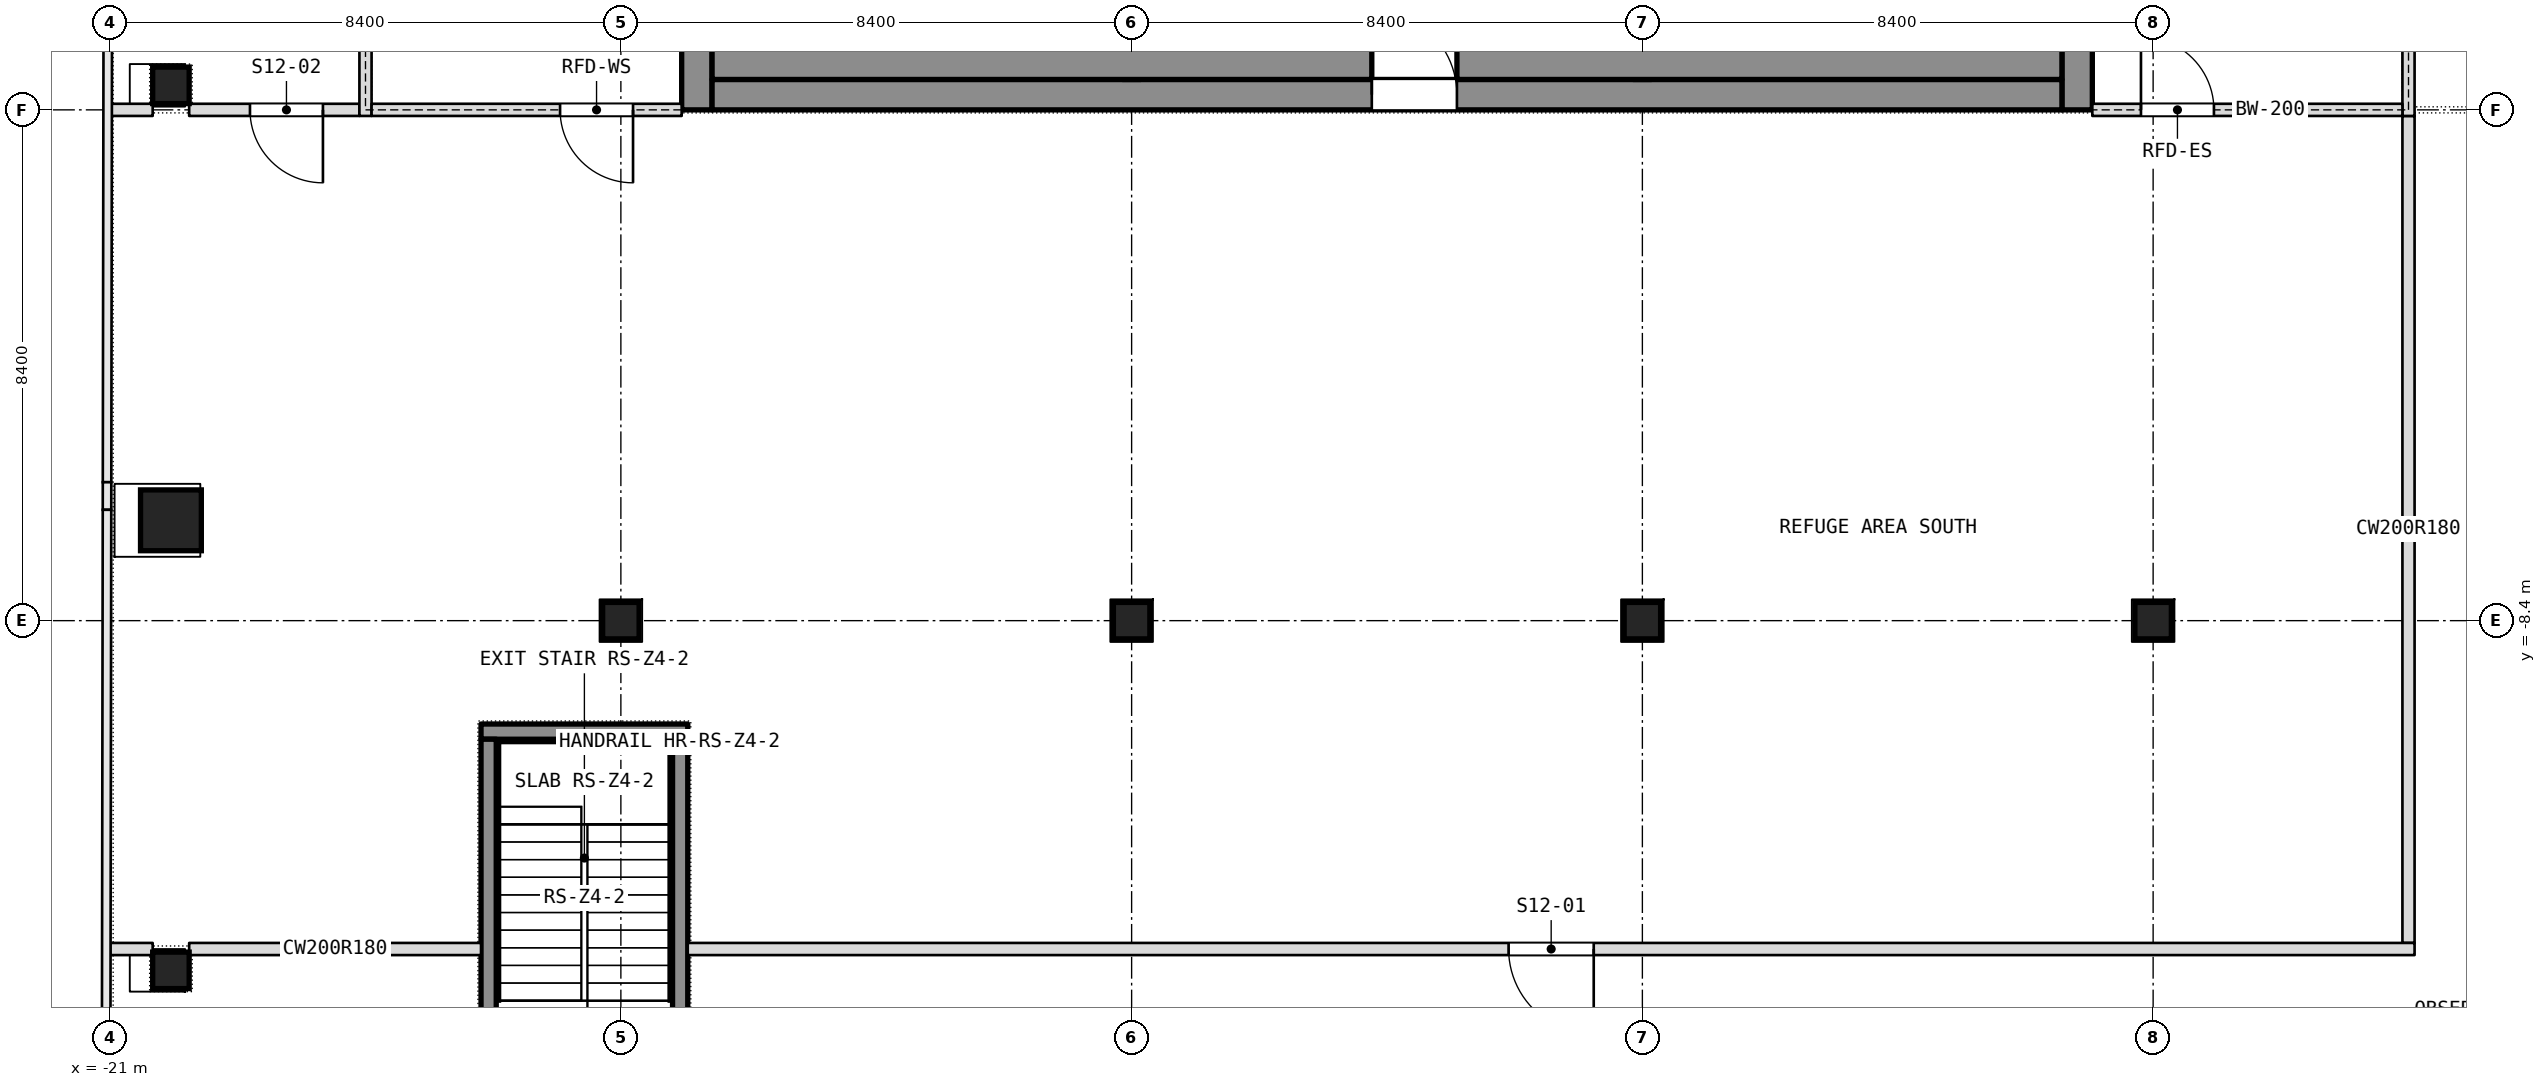
"""IFC4 building model, lengths in metres.
Left out: names, types, materials, properties, quantities, classifications, styles, units other than length and angle.
Written with IfcOpenShell. Run it as: python <this file> out.ifc"""

import sys

from ifc_helpers import new_model, si_unit, direction, frame, frame_2d, origin, origin_2d, place, context, subcontext, project, spatial, rectangle, extrude, element, fill, save


model = new_model("IFC4")
c1 = context("Model", 3, precision=1e-05, world=origin(), true_north=direction((0.0, 1.0)))
c2 = subcontext(c1, "Body", "Model", "MODEL_VIEW")
j1 = project(units=[si_unit("LENGTHUNIT", "METRE"), si_unit("PLANEANGLEUNIT", "RADIAN")], contexts=[c1])
p1 = place(None, origin())
s1 = spatial("IfcSite", under=j1, at=p1, CompositionType="ELEMENT")
p2 = place(p1, origin())
s2 = spatial("IfcBuilding", under=s1, at=p2, CompositionType="ELEMENT")
p3 = place(p2, frame((0.0, 0.0, 281.3)))
s3 = spatial("IfcBuildingStorey", under=s2, at=p3, CompositionType="ELEMENT", Elevation=281.3)
p4 = place(p3, frame((11.35, 0.0, 0.0), z_axis=(0.0, 0.0, 1.0), x_axis=(0.0, 1.0, 0.0)))
e1 = element("IfcWall", 1, at=p4, inside=s3, PredefinedType="SHEAR", context=c2, shape_type="SweptSolid", body=[
    extrude(rectangle(XDim=16.8, YDim=0.5, at=frame_2d((8.4, 0.0))), origin(), (0.0, 0.0, 1.0), 7.2),
])
p5 = place(p4, frame((6.825, 0.0, 0.0)))
e2 = element("IfcOpeningElement", 2, at=p5, cuts=e1, PredefinedType="OPENING", context=c2, shape_type="SweptSolid", body=[
    extrude(rectangle(XDim=1.2, YDim=2.1, at=frame_2d((0.6, 1.05))), frame((0.0, 0.25, 0.0), z_axis=(0.0, -1.0, 0.0), x_axis=(1.0, 0.0, 0.0)), (0.0, 0.0, 1.0), 0.5),
])
p6 = place(p4, frame((8.775, 0.0, 0.0)))
e3 = element("IfcOpeningElement", 3, at=p6, cuts=e1, PredefinedType="OPENING", context=c2, shape_type="SweptSolid", body=[
    extrude(rectangle(XDim=1.2, YDim=2.1, at=frame_2d((0.6, 1.05))), frame((0.0, 0.25, 0.0), z_axis=(0.0, -1.0, 0.0), x_axis=(1.0, 0.0, 0.0)), (0.0, 0.0, 1.0), 0.5),
])
p7 = place(p3, frame((-11.35, 0.0, 0.0), z_axis=(0.0, 0.0, 1.0), x_axis=(0.0, 1.0, 0.0)))
e4 = element("IfcWall", 4, at=p7, inside=s3, PredefinedType="SHEAR", context=c2, shape_type="SweptSolid", body=[
    extrude(rectangle(XDim=16.8, YDim=0.5, at=frame_2d((8.4, 0.0))), origin(), (0.0, 0.0, 1.0), 7.2),
])
p8 = place(p7, frame((1.688, 0.0, 0.0)))
e5 = element("IfcOpeningElement", 5, at=p8, cuts=e4, PredefinedType="OPENING", context=c2, shape_type="SweptSolid", body=[
    extrude(rectangle(XDim=0.9, YDim=2.1, at=frame_2d((0.45, 1.05))), frame((0.0, 0.25, 0.0), z_axis=(0.0, -1.0, 0.0), x_axis=(1.0, 0.0, 0.0)), (0.0, 0.0, 1.0), 0.5),
])
p9 = place(p7, frame((4.312, 0.0, 0.0)))
e6 = element("IfcOpeningElement", 6, at=p9, cuts=e4, PredefinedType="OPENING", context=c2, shape_type="SweptSolid", body=[
    extrude(rectangle(XDim=0.9, YDim=2.1, at=frame_2d((0.45, 1.05))), frame((0.0, 0.25, 0.0), z_axis=(0.0, -1.0, 0.0), x_axis=(1.0, 0.0, 0.0)), (0.0, 0.0, 1.0), 0.5),
])
p10 = place(p7, frame((6.825, 0.0, 0.0)))
e7 = element("IfcOpeningElement", 7, at=p10, cuts=e4, PredefinedType="OPENING", context=c2, shape_type="SweptSolid", body=[
    extrude(rectangle(XDim=1.2, YDim=2.1, at=frame_2d((0.6, 1.05))), frame((0.0, 0.25, 0.0), z_axis=(0.0, -1.0, 0.0), x_axis=(1.0, 0.0, 0.0)), (0.0, 0.0, 1.0), 0.5),
])
p11 = place(p7, frame((12.3, 0.0, 0.0)))
e8 = element("IfcOpeningElement", 8, at=p11, cuts=e4, PredefinedType="OPENING", context=c2, shape_type="SweptSolid", body=[
    extrude(rectangle(XDim=0.9, YDim=2.1, at=frame_2d((0.45, 1.05))), frame((0.0, 0.25, 0.0), z_axis=(0.0, -1.0, 0.0), x_axis=(1.0, 0.0, 0.0)), (0.0, 0.0, 1.0), 0.5),
])
p12 = place(p7, frame((8.775, 0.0, 0.0)))
e9 = element("IfcOpeningElement", 9, at=p12, cuts=e4, PredefinedType="OPENING", context=c2, shape_type="SweptSolid", body=[
    extrude(rectangle(XDim=1.2, YDim=2.1, at=frame_2d((0.6, 1.05))), frame((0.0, 0.25, 0.0), z_axis=(0.0, -1.0, 0.0), x_axis=(1.0, 0.0, 0.0)), (0.0, 0.0, 1.0), 0.5),
])
p13 = place(p3, frame((-11.1, 0.25, 0.0), z_axis=(0.0, 0.0, 1.0), x_axis=(1.0, 0.0, 0.0)))
e10 = element("IfcWall", 10, at=p13, inside=s3, PredefinedType="SHEAR", context=c2, shape_type="SweptSolid", body=[
    extrude(rectangle(XDim=22.2, YDim=0.5, at=frame_2d((11.1, 0.0))), origin(), (0.0, 0.0, 1.0), 7.2),
])
p14 = place(p13, frame((10.85, 0.0, 0.0)))
e11 = element("IfcOpeningElement", 11, at=p14, cuts=e10, PredefinedType="OPENING", context=c2, shape_type="SweptSolid", body=[
    extrude(rectangle(XDim=1.4, YDim=2.1, at=frame_2d((0.7, 1.05))), frame((0.0, 0.25, 0.0), z_axis=(0.0, -1.0, 0.0), x_axis=(1.0, 0.0, 0.0)), (0.0, 0.0, 1.0), 0.5),
])
p15 = place(p3, frame((-4.2, 0.5, 0.0), z_axis=(0.0, 0.0, 1.0), x_axis=(0.0, 1.0, 0.0)))
e12 = element("IfcWall", 12, at=p15, inside=s3, PredefinedType="SHEAR", context=c2, shape_type="SweptSolid", body=[
    extrude(rectangle(XDim=15.8, YDim=0.3, at=frame_2d((7.9, 0.0))), origin(), (0.0, 0.0, 1.0), 7.2),
])
p16 = place(p15, frame((8.8, 0.0, 0.0)))
e13 = element("IfcOpeningElement", 13, at=p16, cuts=e12, PredefinedType="OPENING", context=c2, shape_type="SweptSolid", body=[
    extrude(rectangle(XDim=1.2, YDim=2.1, at=frame_2d((0.6, 1.05))), frame((0.0, 0.15, 0.0), z_axis=(0.0, -1.0, 0.0), x_axis=(1.0, 0.0, 0.0)), (0.0, 0.0, 1.0), 0.3),
])
p17 = place(p3, frame((4.2, 0.5, 0.0), z_axis=(0.0, 0.0, 1.0), x_axis=(0.0, 1.0, 0.0)))
e14 = element("IfcWall", 14, at=p17, inside=s3, PredefinedType="SHEAR", context=c2, shape_type="SweptSolid", body=[
    extrude(rectangle(XDim=15.8, YDim=0.3, at=frame_2d((7.9, 0.0))), origin(), (0.0, 0.0, 1.0), 7.2),
])
p18 = place(p17, frame((6.25, 0.0, 0.0)))
e15 = element("IfcOpeningElement", 15, at=p18, cuts=e14, PredefinedType="OPENING", context=c2, shape_type="SweptSolid", body=[
    extrude(rectangle(XDim=1.2, YDim=2.1, at=frame_2d((0.6, 1.05))), frame((0.0, 0.15, 0.0), z_axis=(0.0, -1.0, 0.0), x_axis=(1.0, 0.0, 0.0)), (0.0, 0.0, 1.0), 0.3),
])
p19 = place(p3, frame((-20.0, -6.75, 0.0), z_axis=(0.0, 0.0, 1.0), x_axis=(1.0, 0.0, 0.0)))
e16 = element("IfcColumn", 16, at=p19, inside=s3, PredefinedType="COLUMN", context=c2, shape_type="SweptSolid", body=[
    extrude(rectangle(XDim=1.0, YDim=1.0, at=origin_2d()), origin(), (0.0, 0.0, 1.0), 7.2),
])
for number, where, z_axis, x_axis in (
    (17, (-12.6, -8.4, 0.0), (0.0, 0.0, 1.0), (1.0, 0.0, 0.0)),
    (18, (-4.2, -8.4, 0.0), (0.0, 0.0, 1.0), (1.0, 0.0, 0.0)),
    (19, (4.2, -8.4, 0.0), (0.0, 0.0, 1.0), (1.0, 0.0, 0.0)),
    (20, (12.6, -8.4, 0.0), (0.0, 0.0, 1.0), (1.0, 0.0, 0.0)),
    (21, (-20.0, -14.151, 0.0), (0.0, 0.0, 1.0), (1.0, 0.0, 0.0)),
    (22, (-20.0, 0.403, 0.0), (0.0, 0.0, 1.0), (1.0, 0.0, 0.0)),
):
    element("IfcColumn", number, at=place(p3, frame(where, z_axis=z_axis, x_axis=x_axis)), inside=s3, PredefinedType="COLUMN", context=c2, shape_type="SweptSolid", body=[
        extrude(rectangle(XDim=0.6, YDim=0.6, at=origin_2d()), origin(), (0.0, 0.0, 1.0), 7.2),
    ])
p20 = place(p3, frame((16.8, -13.7, 0.0), z_axis=(0.0, 0.0, 1.0), x_axis=(0.0, 1.0, 0.0)))
e23 = element("IfcWall", 23, at=p20, inside=s3, PredefinedType="PARTITIONING", context=c2, shape_type="SweptSolid", body=[
    extrude(rectangle(XDim=13.6, YDim=0.2, at=frame_2d((6.8, 0.0))), origin(), (0.0, 0.0, 1.0), 6.94),
])
p21 = place(p3, frame((-21.0, -13.8, 0.0), z_axis=(0.0, 0.0, 1.0), x_axis=(1.0, 0.0, 0.0)))
e24 = element("IfcWall", 24, at=p21, inside=s3, PredefinedType="PARTITIONING", context=c2, shape_type="SweptSolid", body=[
    extrude(rectangle(XDim=0.7, YDim=0.2, at=frame_2d((0.35, 0.0))), origin(), (0.0, 0.0, 1.0), 6.94),
])
p22 = place(p3, frame((-19.7, -13.8, 0.0), z_axis=(0.0, 0.0, 1.0), x_axis=(1.0, 0.0, 0.0)))
e25 = element("IfcWall", 25, at=p22, inside=s3, PredefinedType="PARTITIONING", context=c2, shape_type="SweptSolid", body=[
    extrude(rectangle(XDim=4.8, YDim=0.2, at=frame_2d((2.4, 0.0))), origin(), (0.0, 0.0, 1.0), 6.94),
])
p23 = place(p3, frame((-11.5, -13.8, 0.0), z_axis=(0.0, 0.0, 1.0), x_axis=(1.0, 0.0, 0.0)))
e26 = element("IfcWall", 26, at=p23, inside=s3, PredefinedType="PARTITIONING", context=c2, shape_type="SweptSolid", body=[
    extrude(rectangle(XDim=28.4, YDim=0.2, at=frame_2d((14.2, 0.0))), origin(), (0.0, 0.0, 1.0), 6.94),
])
p24 = place(p23, frame((13.5, 0.0, 0.0)))
e27 = element("IfcOpeningElement", 27, at=p24, cuts=e26, PredefinedType="OPENING", context=c2, shape_type="SweptSolid", body=[
    extrude(rectangle(XDim=1.4, YDim=2.1, at=frame_2d((0.7, 1.05))), frame((0.0, 0.1, 0.0), z_axis=(0.0, -1.0, 0.0), x_axis=(1.0, 0.0, 0.0)), (0.0, 0.0, 1.0), 0.2),
])
p25 = place(p3, frame((-21.0, 0.0, 0.0), z_axis=(0.0, 0.0, 1.0), x_axis=(1.0, 0.0, 0.0)))
e28 = element("IfcWall", 28, at=p25, inside=s3, PredefinedType="PARTITIONING", context=c2, shape_type="SweptSolid", body=[
    extrude(rectangle(XDim=0.7, YDim=0.2, at=frame_2d((0.35, 0.0))), origin(), (0.0, 0.0, 1.0), 6.94),
])
p26 = place(p3, frame((-19.7, 0.0, 0.0), z_axis=(0.0, 0.0, 1.0), x_axis=(1.0, 0.0, 0.0)))
e29 = element("IfcWall", 29, at=p26, inside=s3, PredefinedType="PARTITIONING", context=c2, shape_type="SweptSolid", body=[
    extrude(rectangle(XDim=2.8, YDim=0.2, at=frame_2d((1.4, 0.0))), origin(), (0.0, 0.0, 1.0), 6.6),
])
p27 = place(p26, frame((1.0, 0.0, 0.0)))
e30 = element("IfcOpeningElement", 30, at=p27, cuts=e29, PredefinedType="OPENING", context=c2, shape_type="SweptSolid", body=[
    extrude(rectangle(XDim=1.2, YDim=2.1, at=frame_2d((0.6, 1.05))), frame((0.0, 0.1, 0.0), z_axis=(0.0, -1.0, 0.0), x_axis=(1.0, 0.0, 0.0)), (0.0, 0.0, 1.0), 0.2),
])
p28 = place(p3, frame((-11.1, 1.0, 0.0), z_axis=(0.0, 0.0, 1.0), x_axis=(1.0, 0.0, 0.0)))
e31 = element("IfcWall", 31, at=p28, inside=s3, PredefinedType="PARTITIONING", context=c2, shape_type="SweptSolid", body=[
    extrude(rectangle(XDim=10.85, YDim=1.0, at=frame_2d((5.425, 0.0))), origin(), (0.0, 0.0, 1.0), 6.94),
])
p29 = place(p3, frame((1.15, 1.0, 0.0), z_axis=(0.0, 0.0, 1.0), x_axis=(1.0, 0.0, 0.0)))
e32 = element("IfcWall", 32, at=p29, inside=s3, PredefinedType="PARTITIONING", context=c2, shape_type="SweptSolid", body=[
    extrude(rectangle(XDim=9.95, YDim=1.0, at=frame_2d((4.975, 0.0))), origin(), (0.0, 0.0, 1.0), 6.94),
])
p30 = place(p3, frame((-16.8, -0.1, 0.0), z_axis=(0.0, 0.0, 1.0), x_axis=(0.0, 1.0, 0.0)))
e33 = element("IfcWall", 33, at=p30, inside=s3, PredefinedType="PARTITIONING", context=c2, shape_type="SweptSolid", body=[
    extrude(rectangle(XDim=17.0, YDim=0.2, at=frame_2d((8.5, 0.0))), origin(), (0.0, 0.0, 1.0), 6.94),
])
p31 = place(p30, frame((1.9, 0.0, 0.0)))
e34 = element("IfcOpeningElement", 34, at=p31, cuts=e33, PredefinedType="OPENING", context=c2, shape_type="SweptSolid", body=[
    extrude(rectangle(XDim=2.4, YDim=2.1, at=frame_2d((1.2, 1.05))), frame((0.0, 0.1, 0.0), z_axis=(0.0, -1.0, 0.0), x_axis=(1.0, 0.0, 0.0)), (0.0, 0.0, 1.0), 0.2),
])
p32 = place(p30, frame((10.3, 0.0, 0.0)))
e35 = element("IfcOpeningElement", 35, at=p32, cuts=e33, PredefinedType="OPENING", context=c2, shape_type="SweptSolid", body=[
    extrude(rectangle(XDim=2.4, YDim=2.1, at=frame_2d((1.2, 1.05))), frame((0.0, 0.1, 0.0), z_axis=(0.0, -1.0, 0.0), x_axis=(1.0, 0.0, 0.0)), (0.0, 0.0, 1.0), 0.2),
])
p33 = place(p3, frame((-16.7, 0.0, 0.0), z_axis=(0.0, 0.0, 1.0), x_axis=(1.0, 0.0, 0.0)))
e36 = element("IfcWall", 36, at=p33, inside=s3, PredefinedType="PARTITIONING", context=c2, shape_type="SweptSolid", body=[
    extrude(rectangle(XDim=5.1, YDim=0.2, at=frame_2d((2.55, 0.0))), origin(), (0.0, 0.0, 1.0), 6.6),
])
p34 = place(p33, frame((3.1, 0.0, 0.0)))
e37 = element("IfcOpeningElement", 37, at=p34, cuts=e36, PredefinedType="OPENING", context=c2, shape_type="SweptSolid", body=[
    extrude(rectangle(XDim=1.2, YDim=2.1, at=frame_2d((0.6, 1.05))), frame((0.0, 0.1, 0.0), z_axis=(0.0, -1.0, 0.0), x_axis=(1.0, 0.0, 0.0)), (0.0, 0.0, 1.0), 0.2),
])
p35 = place(p3, frame((16.8, -0.1, 0.0), z_axis=(0.0, 0.0, 1.0), x_axis=(0.0, 1.0, 0.0)))
e38 = element("IfcWall", 38, at=p35, inside=s3, PredefinedType="PARTITIONING", context=c2, shape_type="SweptSolid", body=[
    extrude(rectangle(XDim=17.0, YDim=0.2, at=frame_2d((8.5, 0.0))), origin(), (0.0, 0.0, 1.0), 6.94),
])
p36 = place(p35, frame((1.9, 0.0, 0.0)))
e39 = element("IfcOpeningElement", 39, at=p36, cuts=e38, PredefinedType="OPENING", context=c2, shape_type="SweptSolid", body=[
    extrude(rectangle(XDim=2.4, YDim=2.1, at=frame_2d((1.2, 1.05))), frame((0.0, 0.1, 0.0), z_axis=(0.0, -1.0, 0.0), x_axis=(1.0, 0.0, 0.0)), (0.0, 0.0, 1.0), 0.2),
])
p37 = place(p35, frame((10.3, 0.0, 0.0)))
e40 = element("IfcOpeningElement", 40, at=p37, cuts=e38, PredefinedType="OPENING", context=c2, shape_type="SweptSolid", body=[
    extrude(rectangle(XDim=2.4, YDim=2.1, at=frame_2d((1.2, 1.05))), frame((0.0, 0.1, 0.0), z_axis=(0.0, -1.0, 0.0), x_axis=(1.0, 0.0, 0.0)), (0.0, 0.0, 1.0), 0.2),
])
p38 = place(p3, frame((11.6, 0.0, 0.0), z_axis=(0.0, 0.0, 1.0), x_axis=(1.0, 0.0, 0.0)))
e41 = element("IfcWall", 41, at=p38, inside=s3, PredefinedType="PARTITIONING", context=c2, shape_type="SweptSolid", body=[
    extrude(rectangle(XDim=5.1, YDim=0.2, at=frame_2d((2.55, 0.0))), origin(), (0.0, 0.0, 1.0), 6.6),
])
p39 = place(p38, frame((0.8, 0.0, 0.0)))
e42 = element("IfcOpeningElement", 42, at=p39, cuts=e41, PredefinedType="OPENING", context=c2, shape_type="SweptSolid", body=[
    extrude(rectangle(XDim=1.2, YDim=2.1, at=frame_2d((0.6, 1.05))), frame((0.0, 0.1, 0.0), z_axis=(0.0, -1.0, 0.0), x_axis=(1.0, 0.0, 0.0)), (0.0, 0.0, 1.0), 0.2),
])
p40 = place(p3, frame((-14.9, -10.225, 0.1), z_axis=(0.0, 0.0, 1.0), x_axis=(1.0, 0.0, 0.0)))
e43 = element("IfcWall", 43, at=p40, inside=s3, PredefinedType="SHEAR", context=c2, shape_type="SweptSolid", body=[
    extrude(rectangle(XDim=3.4, YDim=0.25, at=frame_2d((1.7, 0.0))), origin(), (0.0, 0.0, 1.0), 7.2),
])
p41 = place(p3, frame((-14.775, -16.05, 0.1), z_axis=(0.0, 0.0, 1.0), x_axis=(0.0, 1.0, 0.0)))
e44 = element("IfcWall", 44, at=p41, inside=s3, PredefinedType="SHEAR", context=c2, shape_type="SweptSolid", body=[
    extrude(rectangle(XDim=5.7, YDim=0.25, at=frame_2d((2.85, 0.0))), origin(), (0.0, 0.0, 1.0), 7.2),
])
p42 = place(p3, frame((-11.625, -16.05, 0.1), z_axis=(0.0, 0.0, 1.0), x_axis=(0.0, 1.0, 0.0)))
e45 = element("IfcWall", 45, at=p42, inside=s3, PredefinedType="SHEAR", context=c2, shape_type="SweptSolid", body=[
    extrude(rectangle(XDim=5.7, YDim=0.25, at=frame_2d((2.85, 0.0))), origin(), (0.0, 0.0, 1.0), 7.2),
])
p43 = place(p42, frame((0.2, 0.0, 0.0)))
e46 = element("IfcOpeningElement", 46, at=p43, cuts=e45, PredefinedType="OPENING", context=c2, shape_type="SweptSolid", body=[
    extrude(rectangle(XDim=1.0, YDim=2.1, at=frame_2d((0.5, 1.05))), frame((0.0, 0.125, 0.0), z_axis=(0.0, -1.0, 0.0), x_axis=(1.0, 0.0, 0.0)), (0.0, 0.0, 1.0), 0.25),
])
p44 = place(p24, origin())
e47 = element("IfcDoor", 47, at=p44, inside=s3, OperationType="DOUBLE_DOOR_SINGLE_SWING", PredefinedType="DOOR", context=c2, shape_type="SweptSolid", body=[
    extrude(rectangle(XDim=1.4, YDim=2.1, at=frame_2d((0.7, 1.05))), frame((0.0, 0.025, 0.0), z_axis=(0.0, -1.0, 0.0), x_axis=(1.0, 0.0, 0.0)), (0.0, 0.0, 1.0), 0.05),
])
fill(e27, e47)
p45 = place(p27, origin())
e48 = element("IfcDoor", 48, at=p45, inside=s3, OperationType="SINGLE_SWING_LEFT", PredefinedType="DOOR", context=c2, shape_type="SweptSolid", body=[
    extrude(rectangle(XDim=1.2, YDim=2.1, at=frame_2d((0.6, 1.05))), frame((0.0, 0.025, 0.0), z_axis=(0.0, -1.0, 0.0), x_axis=(1.0, 0.0, 0.0)), (0.0, 0.0, 1.0), 0.05),
])
fill(e30, e48)
p46 = place(p14, origin())
e49 = element("IfcDoor", 49, at=p46, inside=s3, OperationType="SINGLE_SWING_LEFT", PredefinedType="DOOR", context=c2, shape_type="SweptSolid", body=[
    extrude(rectangle(XDim=1.4, YDim=2.1, at=frame_2d((0.7, 1.05))), frame((0.0, 0.025, 0.0), z_axis=(0.0, -1.0, 0.0), x_axis=(1.0, 0.0, 0.0)), (0.0, 0.0, 1.0), 0.05),
])
fill(e11, e49)
p47 = place(p34, origin())
e50 = element("IfcDoor", 50, at=p47, inside=s3, OperationType="SINGLE_SWING_LEFT", PredefinedType="DOOR", context=c2, shape_type="SweptSolid", body=[
    extrude(rectangle(XDim=1.2, YDim=2.1, at=frame_2d((0.6, 1.05))), frame((0.0, 0.025, 0.0), z_axis=(0.0, -1.0, 0.0), x_axis=(1.0, 0.0, 0.0)), (0.0, 0.0, 1.0), 0.05),
])
fill(e37, e50)
p48 = place(p39, origin())
e51 = element("IfcDoor", 51, at=p48, inside=s3, OperationType="SINGLE_SWING_LEFT", PredefinedType="DOOR", context=c2, shape_type="SweptSolid", body=[
    extrude(rectangle(XDim=1.2, YDim=2.1, at=frame_2d((0.6, 1.05))), frame((0.0, 0.025, 0.0), z_axis=(0.0, -1.0, 0.0), x_axis=(1.0, 0.0, 0.0)), (0.0, 0.0, 1.0), 0.05),
])
fill(e42, e51)
save(model, sys.argv[1])
